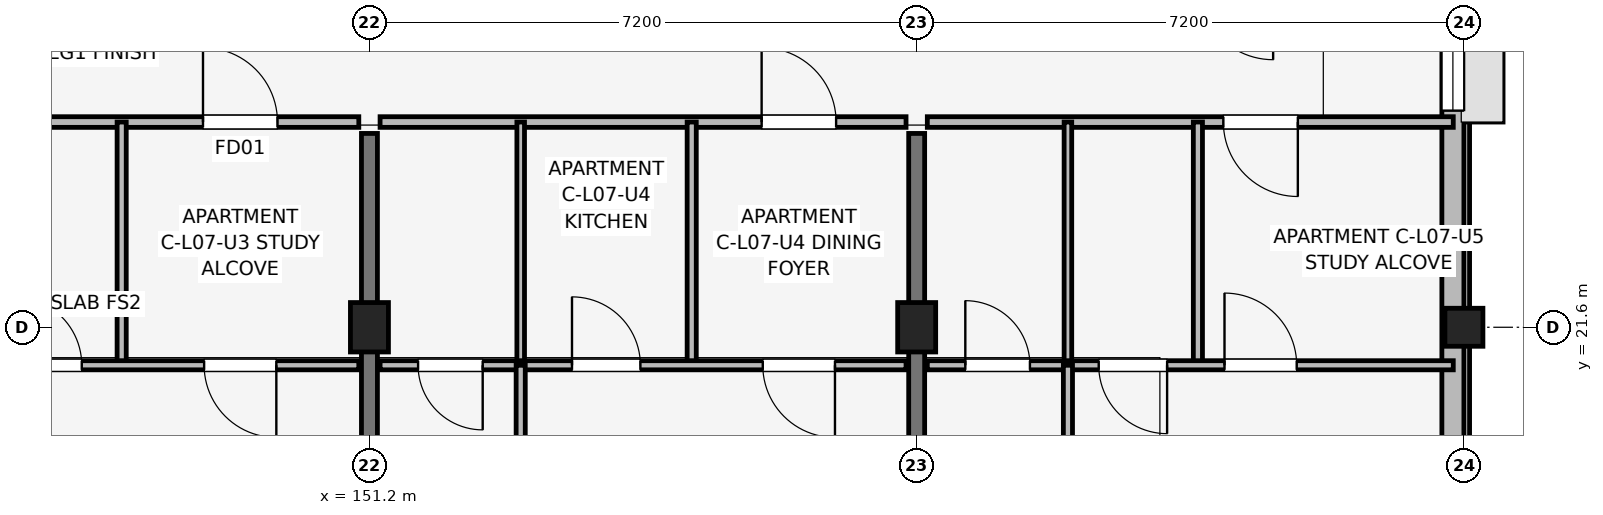
"""IFC4 building model, lengths in metres.
Left out: names, types, materials, properties, quantities, classifications, styles, units other than length and angle.
Written with IfcOpenShell. Run it as: python <this file> out.ifc"""

import sys

from ifc_helpers import new_model, si_unit, direction, frame, frame_2d, origin, origin_2d, place, context, subcontext, project, spatial, rectangle, extrude, element, fill, save


model = new_model("IFC4")
c1 = context("Model", 3, precision=1e-05, world=origin(), true_north=direction((0.0, 1.0)))
c2 = subcontext(c1, "Body", "Model", "MODEL_VIEW")
j1 = project(units=[si_unit("LENGTHUNIT", "METRE"), si_unit("PLANEANGLEUNIT", "RADIAN")], contexts=[c1])
p1 = place(None, origin())
s1 = spatial("IfcSite", under=j1, at=p1, CompositionType="ELEMENT")
p2 = place(p1, origin())
s2 = spatial("IfcBuilding", under=s1, at=p2, CompositionType="ELEMENT")
p3 = place(p2, frame((0.0, 0.0, 24.45)))
s3 = spatial("IfcBuildingStorey", under=s2, at=p3, CompositionType="ELEMENT", Elevation=24.45)
for number, where, z_axis, x_axis in (
    (1, (151.2, 21.6, 0.0), (0.0, 0.0, 1.0), (1.0, 0.0, 0.0)),
    (2, (158.4, 21.6, 0.0), (0.0, 0.0, 1.0), (1.0, 0.0, 0.0)),
):
    element("IfcColumn", number, at=place(p3, frame(where, z_axis=z_axis, x_axis=x_axis)), inside=s3, PredefinedType="COLUMN", context=c2, shape_type="SweptSolid", body=[
        extrude(rectangle(XDim=0.5, YDim=0.65, at=origin_2d()), origin(), (0.0, 0.0, 1.0), 3.15),
    ])
p4 = place(p3, frame((165.6, 21.6, 0.0), z_axis=(0.0, 0.0, 1.0), x_axis=(1.0, 0.0, 0.0)))
e3 = element("IfcColumn", 3, at=p4, inside=s3, PredefinedType="COLUMN", context=c2, shape_type="SweptSolid", body=[
    extrude(rectangle(XDim=0.5, YDim=0.5, at=origin_2d()), origin(), (0.0, 0.0, 1.0), 3.15),
])
for number, where, z_axis, x_axis in (
    (4, (151.2, 14.75, 0.0), (0.0, 0.0, 1.0), (0.0, 1.0, 0.0)),
    (5, (158.4, 14.75, 0.0), (0.0, 0.0, 1.0), (0.0, 1.0, 0.0)),
):
    element("IfcWall", number, at=place(p3, frame(where, z_axis=z_axis, x_axis=x_axis)), inside=s3, PredefinedType="SHEAR", context=c2, shape_type="SweptSolid", body=[
        extrude(rectangle(XDim=9.4, YDim=0.21, at=frame_2d((4.7, 0.0))), origin(), (0.0, 0.0, 1.0), 3.15),
    ])
p5 = place(p3, frame((165.455, 17.4, 0.0), z_axis=(0.0, 0.0, 1.0), x_axis=(0.0, 1.0, 0.0)))
e6 = element("IfcWall", 6, at=p5, inside=s3, PredefinedType="SOLIDWALL", context=c2, shape_type="SweptSolid", body=[
    extrude(rectangle(XDim=15.6, YDim=0.29, at=frame_2d((7.8, 0.0))), origin(), (0.0, 0.0, 1.0), 2.43),
])
p6 = place(p5, frame((7.05, 0.0, 1.05)))
e7 = element("IfcOpeningElement", 7, at=p6, cuts=e6, PredefinedType="OPENING", context=c2, shape_type="SweptSolid", body=[
    extrude(rectangle(XDim=1.5, YDim=1.15, at=frame_2d((0.75, 0.575))), frame((0.0, 0.155, 0.0), z_axis=(0.0, -1.0, 0.0), x_axis=(1.0, 0.0, 0.0)), (0.0, 0.0, 1.0), 0.31),
])
p7 = place(p5, frame((1.255, 0.0, 0.72)))
e8 = element("IfcOpeningElement", 8, at=p7, cuts=e6, PredefinedType="OPENING", context=c2, shape_type="SweptSolid", body=[
    extrude(rectangle(XDim=1.42, YDim=1.6, at=frame_2d((0.71, 0.8))), frame((0.0, 0.155, 0.0), z_axis=(0.0, -1.0, 0.0), x_axis=(1.0, 0.0, 0.0)), (0.0, 0.0, 1.0), 0.31),
])
p8 = place(p3, frame((144.14, 24.3, 0.0), z_axis=(0.0, 0.0, 1.0), x_axis=(1.0, 0.0, 0.0)))
e9 = element("IfcWall", 9, at=p8, inside=s3, PredefinedType="PARTITIONING", context=c2, shape_type="SweptSolid", body=[
    extrude(rectangle(XDim=6.92, YDim=0.14, at=frame_2d((3.46, 0.0))), origin(), (0.0, 0.0, 1.0), 2.38),
])
p9 = place(p8, frame((4.87, 0.0, 0.0)))
e10 = element("IfcOpeningElement", 10, at=p9, cuts=e9, PredefinedType="OPENING", context=c2, shape_type="SweptSolid", body=[
    extrude(rectangle(XDim=0.98, YDim=2.1, at=frame_2d((0.49, 1.05))), frame((0.0, 0.08, 0.0), z_axis=(0.0, -1.0, 0.0), x_axis=(1.0, 0.0, 0.0)), (0.0, 0.0, 1.0), 0.16),
])
p10 = place(p3, frame((147.94, 21.1, 0.0), z_axis=(0.0, 0.0, 1.0), x_axis=(0.0, 1.0, 0.0)))
e11 = element("IfcWall", 11, at=p10, inside=s3, PredefinedType="PARTITIONING", context=c2, shape_type="SweptSolid", body=[
    extrude(rectangle(XDim=3.2, YDim=0.12, at=frame_2d((1.6, 0.0))), origin(), (0.0, 0.0, 1.0), 2.38),
])
p11 = place(p3, frame((144.14, 21.1, 0.0), z_axis=(0.0, 0.0, 1.0), x_axis=(1.0, 0.0, 0.0)))
e12 = element("IfcWall", 12, at=p11, inside=s3, PredefinedType="PARTITIONING", context=c2, shape_type="SweptSolid", body=[
    extrude(rectangle(XDim=6.92, YDim=0.12, at=frame_2d((3.46, 0.0))), origin(), (0.0, 0.0, 1.0), 2.38),
])
p12 = place(p11, frame((1.35, 0.0, 0.0), z_axis=(0.0, 0.0, 1.0), x_axis=(-1.0, 0.0, 0.0)))
e13 = element("IfcOpeningElement", 13, at=p12, cuts=e12, PredefinedType="OPENING", context=c2, shape_type="SweptSolid", body=[
    extrude(rectangle(XDim=0.85, YDim=2.08, at=frame_2d((0.425, 1.04))), frame((0.0, 0.07, 0.0), z_axis=(0.0, -1.0, 0.0), x_axis=(1.0, 0.0, 0.0)), (0.0, 0.0, 1.0), 0.14),
])
p13 = place(p11, frame((2.375, 0.0, 0.0)))
e14 = element("IfcOpeningElement", 14, at=p13, cuts=e12, PredefinedType="OPENING", context=c2, shape_type="SweptSolid", body=[
    extrude(rectangle(XDim=0.9, YDim=2.08, at=frame_2d((0.45, 1.04))), frame((0.0, 0.07, 0.0), z_axis=(0.0, -1.0, 0.0), x_axis=(1.0, 0.0, 0.0)), (0.0, 0.0, 1.0), 0.14),
])
p14 = place(p11, frame((5.835, 0.0, 0.0), z_axis=(0.0, 0.0, 1.0), x_axis=(-1.0, 0.0, 0.0)))
e15 = element("IfcOpeningElement", 15, at=p14, cuts=e12, PredefinedType="OPENING", context=c2, shape_type="SweptSolid", body=[
    extrude(rectangle(XDim=0.95, YDim=2.08, at=frame_2d((0.475, 1.04))), frame((0.0, 0.07, 0.0), z_axis=(0.0, -1.0, 0.0), x_axis=(1.0, 0.0, 0.0)), (0.0, 0.0, 1.0), 0.14),
])
p15 = place(p3, frame((151.34, 24.3, 0.0), z_axis=(0.0, 0.0, 1.0), x_axis=(1.0, 0.0, 0.0)))
e16 = element("IfcWall", 16, at=p15, inside=s3, PredefinedType="PARTITIONING", context=c2, shape_type="SweptSolid", body=[
    extrude(rectangle(XDim=6.92, YDim=0.14, at=frame_2d((3.46, 0.0))), origin(), (0.0, 0.0, 1.0), 2.38),
])
p16 = place(p15, frame((5.02, 0.0, 0.0)))
e17 = element("IfcOpeningElement", 17, at=p16, cuts=e16, PredefinedType="OPENING", context=c2, shape_type="SweptSolid", body=[
    extrude(rectangle(XDim=0.98, YDim=2.1, at=frame_2d((0.49, 1.05))), frame((0.0, 0.08, 0.0), z_axis=(0.0, -1.0, 0.0), x_axis=(1.0, 0.0, 0.0)), (0.0, 0.0, 1.0), 0.16),
])
p17 = place(p3, frame((153.19, 21.1, 0.0), z_axis=(0.0, 0.0, 1.0), x_axis=(0.0, 1.0, 0.0)))
e18 = element("IfcWall", 18, at=p17, inside=s3, PredefinedType="PARTITIONING", context=c2, shape_type="SweptSolid", body=[
    extrude(rectangle(XDim=3.2, YDim=0.1, at=frame_2d((1.6, 0.0))), origin(), (0.0, 0.0, 1.0), 2.38),
])
p18 = place(p3, frame((155.44, 21.1, 0.0), z_axis=(0.0, 0.0, 1.0), x_axis=(0.0, 1.0, 0.0)))
e19 = element("IfcWall", 19, at=p18, inside=s3, PredefinedType="PARTITIONING", context=c2, shape_type="SweptSolid", body=[
    extrude(rectangle(XDim=3.2, YDim=0.12, at=frame_2d((1.6, 0.0))), origin(), (0.0, 0.0, 1.0), 2.38),
])
p19 = place(p3, frame((151.34, 21.1, 0.0), z_axis=(0.0, 0.0, 1.0), x_axis=(1.0, 0.0, 0.0)))
e20 = element("IfcWall", 20, at=p19, inside=s3, PredefinedType="PARTITIONING", context=c2, shape_type="SweptSolid", body=[
    extrude(rectangle(XDim=6.92, YDim=0.12, at=frame_2d((3.46, 0.0))), origin(), (0.0, 0.0, 1.0), 2.38),
])
p20 = place(p19, frame((1.35, 0.0, 0.0), z_axis=(0.0, 0.0, 1.0), x_axis=(-1.0, 0.0, 0.0)))
e21 = element("IfcOpeningElement", 21, at=p20, cuts=e20, PredefinedType="OPENING", context=c2, shape_type="SweptSolid", body=[
    extrude(rectangle(XDim=0.85, YDim=2.08, at=frame_2d((0.425, 1.04))), frame((0.0, 0.07, 0.0), z_axis=(0.0, -1.0, 0.0), x_axis=(1.0, 0.0, 0.0)), (0.0, 0.0, 1.0), 0.14),
])
p21 = place(p19, frame((2.525, 0.0, 0.0)))
e22 = element("IfcOpeningElement", 22, at=p21, cuts=e20, PredefinedType="OPENING", context=c2, shape_type="SweptSolid", body=[
    extrude(rectangle(XDim=0.9, YDim=2.08, at=frame_2d((0.45, 1.04))), frame((0.0, 0.07, 0.0), z_axis=(0.0, -1.0, 0.0), x_axis=(1.0, 0.0, 0.0)), (0.0, 0.0, 1.0), 0.14),
])
p22 = place(p19, frame((5.985, 0.0, 0.0), z_axis=(0.0, 0.0, 1.0), x_axis=(-1.0, 0.0, 0.0)))
e23 = element("IfcOpeningElement", 23, at=p22, cuts=e20, PredefinedType="OPENING", context=c2, shape_type="SweptSolid", body=[
    extrude(rectangle(XDim=0.95, YDim=2.08, at=frame_2d((0.475, 1.04))), frame((0.0, 0.07, 0.0), z_axis=(0.0, -1.0, 0.0), x_axis=(1.0, 0.0, 0.0)), (0.0, 0.0, 1.0), 0.14),
])
p23 = place(p3, frame((153.19, 14.7, 0.0), z_axis=(0.0, 0.0, 1.0), x_axis=(0.0, 1.0, 0.0)))
e24 = element("IfcWall", 24, at=p23, inside=s3, PredefinedType="PARTITIONING", context=c2, shape_type="SweptSolid", body=[
    extrude(rectangle(XDim=6.4, YDim=0.12, at=frame_2d((3.2, 0.0))), origin(), (0.0, 0.0, 1.0), 2.38),
])
p24 = place(p23, frame((2.75, 0.0, 0.0)))
e25 = element("IfcOpeningElement", 25, at=p24, cuts=e24, PredefinedType="OPENING", context=c2, shape_type="SweptSolid", body=[
    extrude(rectangle(XDim=0.9, YDim=2.08, at=frame_2d((0.45, 1.04))), frame((0.0, 0.07, 0.0), z_axis=(0.0, -1.0, 0.0), x_axis=(1.0, 0.0, 0.0)), (0.0, 0.0, 1.0), 0.14),
])
p25 = place(p3, frame((158.54, 24.3, 0.0), z_axis=(0.0, 0.0, 1.0), x_axis=(1.0, 0.0, 0.0)))
e26 = element("IfcWall", 26, at=p25, inside=s3, PredefinedType="PARTITIONING", context=c2, shape_type="SweptSolid", body=[
    extrude(rectangle(XDim=6.92, YDim=0.14, at=frame_2d((3.46, 0.0))), origin(), (0.0, 0.0, 1.0), 2.38),
])
p26 = place(p25, frame((4.875, 0.0, 0.0), z_axis=(0.0, 0.0, 1.0), x_axis=(-1.0, 0.0, 0.0)))
e27 = element("IfcOpeningElement", 27, at=p26, cuts=e26, PredefinedType="OPENING", context=c2, shape_type="SweptSolid", body=[
    extrude(rectangle(XDim=0.98, YDim=2.1, at=frame_2d((0.49, 1.05))), frame((0.0, 0.08, 0.0), z_axis=(0.0, -1.0, 0.0), x_axis=(1.0, 0.0, 0.0)), (0.0, 0.0, 1.0), 0.16),
])
p27 = place(p3, frame((160.39, 21.1, 0.0), z_axis=(0.0, 0.0, 1.0), x_axis=(0.0, 1.0, 0.0)))
e28 = element("IfcWall", 28, at=p27, inside=s3, PredefinedType="PARTITIONING", context=c2, shape_type="SweptSolid", body=[
    extrude(rectangle(XDim=3.2, YDim=0.1, at=frame_2d((1.6, 0.0))), origin(), (0.0, 0.0, 1.0), 2.38),
])
p28 = place(p3, frame((162.1, 21.1, 0.0), z_axis=(0.0, 0.0, 1.0), x_axis=(0.0, 1.0, 0.0)))
e29 = element("IfcWall", 29, at=p28, inside=s3, PredefinedType="PARTITIONING", context=c2, shape_type="SweptSolid", body=[
    extrude(rectangle(XDim=3.2, YDim=0.12, at=frame_2d((1.6, 0.0))), origin(), (0.0, 0.0, 1.0), 2.38),
])
p29 = place(p3, frame((158.54, 21.1, 0.0), z_axis=(0.0, 0.0, 1.0), x_axis=(1.0, 0.0, 0.0)))
e30 = element("IfcWall", 30, at=p29, inside=s3, PredefinedType="PARTITIONING", context=c2, shape_type="SweptSolid", body=[
    extrude(rectangle(XDim=6.92, YDim=0.12, at=frame_2d((3.46, 0.0))), origin(), (0.0, 0.0, 1.0), 2.38),
])
p30 = place(p29, frame((0.5, 0.0, 0.0)))
e31 = element("IfcOpeningElement", 31, at=p30, cuts=e30, PredefinedType="OPENING", context=c2, shape_type="SweptSolid", body=[
    extrude(rectangle(XDim=0.85, YDim=2.08, at=frame_2d((0.425, 1.04))), frame((0.0, 0.07, 0.0), z_axis=(0.0, -1.0, 0.0), x_axis=(1.0, 0.0, 0.0)), (0.0, 0.0, 1.0), 0.14),
])
p31 = place(p29, frame((3.155, 0.0, 0.0), z_axis=(0.0, 0.0, 1.0), x_axis=(-1.0, 0.0, 0.0)))
e32 = element("IfcOpeningElement", 32, at=p31, cuts=e30, PredefinedType="OPENING", context=c2, shape_type="SweptSolid", body=[
    extrude(rectangle(XDim=0.9, YDim=2.08, at=frame_2d((0.45, 1.04))), frame((0.0, 0.07, 0.0), z_axis=(0.0, -1.0, 0.0), x_axis=(1.0, 0.0, 0.0)), (0.0, 0.0, 1.0), 0.14),
])
p32 = place(p29, frame((3.91, 0.0, 0.0)))
e33 = element("IfcOpeningElement", 33, at=p32, cuts=e30, PredefinedType="OPENING", context=c2, shape_type="SweptSolid", body=[
    extrude(rectangle(XDim=0.95, YDim=2.08, at=frame_2d((0.475, 1.04))), frame((0.0, 0.07, 0.0), z_axis=(0.0, -1.0, 0.0), x_axis=(1.0, 0.0, 0.0)), (0.0, 0.0, 1.0), 0.14),
])
p33 = place(p3, frame((160.39, 14.7, 0.0), z_axis=(0.0, 0.0, 1.0), x_axis=(0.0, 1.0, 0.0)))
e34 = element("IfcWall", 34, at=p33, inside=s3, PredefinedType="PARTITIONING", context=c2, shape_type="SweptSolid", body=[
    extrude(rectangle(XDim=6.4, YDim=0.12, at=frame_2d((3.2, 0.0))), origin(), (0.0, 0.0, 1.0), 2.38),
])
p34 = place(p33, frame((2.75, 0.0, 0.0)))
e35 = element("IfcOpeningElement", 35, at=p34, cuts=e34, PredefinedType="OPENING", context=c2, shape_type="SweptSolid", body=[
    extrude(rectangle(XDim=0.9, YDim=2.08, at=frame_2d((0.45, 1.04))), frame((0.0, 0.07, 0.0), z_axis=(0.0, -1.0, 0.0), x_axis=(1.0, 0.0, 0.0)), (0.0, 0.0, 1.0), 0.14),
])
p35 = place(p6, origin())
e36 = element("IfcWindow", 36, at=p35, inside=s3, PartitioningType="SINGLE_PANEL", PredefinedType="WINDOW", context=c2, shape_type="SweptSolid", body=[
    extrude(rectangle(XDim=1.5, YDim=1.15, at=frame_2d((0.75, 0.575))), frame((0.0, 0.03, 0.0), z_axis=(0.0, -1.0, 0.0), x_axis=(1.0, 0.0, 0.0)), (0.0, 0.0, 1.0), 0.06),
])
fill(e7, e36)
p36 = place(p9, origin())
e37 = element("IfcDoor", 37, at=p36, inside=s3, OperationType="SINGLE_SWING_LEFT", PredefinedType="DOOR", context=c2, shape_type="SweptSolid", body=[
    extrude(rectangle(XDim=0.98, YDim=2.1, at=frame_2d((0.49, 1.05))), frame((0.0, 0.025, 0.0), z_axis=(0.0, -1.0, 0.0), x_axis=(1.0, 0.0, 0.0)), (0.0, 0.0, 1.0), 0.05),
])
fill(e10, e37)
p37 = place(p13, origin())
e38 = element("IfcDoor", 38, at=p37, inside=s3, OperationType="SINGLE_SWING_LEFT", PredefinedType="DOOR", context=c2, shape_type="SweptSolid", body=[
    extrude(rectangle(XDim=0.9, YDim=2.08, at=frame_2d((0.45, 1.04))), frame((0.0, 0.025, 0.0), z_axis=(0.0, -1.0, 0.0), x_axis=(1.0, 0.0, 0.0)), (0.0, 0.0, 1.0), 0.05),
])
fill(e14, e38)
p38 = place(p14, origin())
e39 = element("IfcDoor", 39, at=p38, inside=s3, OperationType="SINGLE_SWING_RIGHT", PredefinedType="DOOR", context=c2, shape_type="SweptSolid", body=[
    extrude(rectangle(XDim=0.95, YDim=2.08, at=frame_2d((0.475, 1.04))), frame((0.0, 0.025, 0.0), z_axis=(0.0, -1.0, 0.0), x_axis=(1.0, 0.0, 0.0)), (0.0, 0.0, 1.0), 0.05),
])
fill(e15, e39)
p39 = place(p16, origin())
e40 = element("IfcDoor", 40, at=p39, inside=s3, OperationType="SINGLE_SWING_LEFT", PredefinedType="DOOR", context=c2, shape_type="SweptSolid", body=[
    extrude(rectangle(XDim=0.98, YDim=2.1, at=frame_2d((0.49, 1.05))), frame((0.0, 0.025, 0.0), z_axis=(0.0, -1.0, 0.0), x_axis=(1.0, 0.0, 0.0)), (0.0, 0.0, 1.0), 0.05),
])
fill(e17, e40)
p40 = place(p20, origin())
e41 = element("IfcDoor", 41, at=p40, inside=s3, OperationType="SINGLE_SWING_RIGHT", PredefinedType="DOOR", context=c2, shape_type="SweptSolid", body=[
    extrude(rectangle(XDim=0.85, YDim=2.08, at=frame_2d((0.425, 1.04))), frame((0.0, 0.025, 0.0), z_axis=(0.0, -1.0, 0.0), x_axis=(1.0, 0.0, 0.0)), (0.0, 0.0, 1.0), 0.05),
])
fill(e21, e41)
p41 = place(p21, origin())
e42 = element("IfcDoor", 42, at=p41, inside=s3, OperationType="SINGLE_SWING_LEFT", PredefinedType="DOOR", context=c2, shape_type="SweptSolid", body=[
    extrude(rectangle(XDim=0.9, YDim=2.08, at=frame_2d((0.45, 1.04))), frame((0.0, 0.025, 0.0), z_axis=(0.0, -1.0, 0.0), x_axis=(1.0, 0.0, 0.0)), (0.0, 0.0, 1.0), 0.05),
])
fill(e22, e42)
p42 = place(p22, origin())
e43 = element("IfcDoor", 43, at=p42, inside=s3, OperationType="SINGLE_SWING_RIGHT", PredefinedType="DOOR", context=c2, shape_type="SweptSolid", body=[
    extrude(rectangle(XDim=0.95, YDim=2.08, at=frame_2d((0.475, 1.04))), frame((0.0, 0.025, 0.0), z_axis=(0.0, -1.0, 0.0), x_axis=(1.0, 0.0, 0.0)), (0.0, 0.0, 1.0), 0.05),
])
fill(e23, e43)
p43 = place(p26, origin())
e44 = element("IfcDoor", 44, at=p43, inside=s3, OperationType="SINGLE_SWING_RIGHT", PredefinedType="DOOR", context=c2, shape_type="SweptSolid", body=[
    extrude(rectangle(XDim=0.98, YDim=2.1, at=frame_2d((0.49, 1.05))), frame((0.0, 0.025, 0.0), z_axis=(0.0, -1.0, 0.0), x_axis=(1.0, 0.0, 0.0)), (0.0, 0.0, 1.0), 0.05),
])
fill(e27, e44)
p44 = place(p30, origin())
e45 = element("IfcDoor", 45, at=p44, inside=s3, OperationType="SINGLE_SWING_LEFT", PredefinedType="DOOR", context=c2, shape_type="SweptSolid", body=[
    extrude(rectangle(XDim=0.85, YDim=2.08, at=frame_2d((0.425, 1.04))), frame((0.0, 0.025, 0.0), z_axis=(0.0, -1.0, 0.0), x_axis=(1.0, 0.0, 0.0)), (0.0, 0.0, 1.0), 0.05),
])
fill(e31, e45)
p45 = place(p31, origin())
e46 = element("IfcDoor", 46, at=p45, inside=s3, OperationType="SINGLE_SWING_RIGHT", PredefinedType="DOOR", context=c2, shape_type="SweptSolid", body=[
    extrude(rectangle(XDim=0.9, YDim=2.08, at=frame_2d((0.45, 1.04))), frame((0.0, 0.025, 0.0), z_axis=(0.0, -1.0, 0.0), x_axis=(1.0, 0.0, 0.0)), (0.0, 0.0, 1.0), 0.05),
])
fill(e32, e46)
p46 = place(p32, origin())
e47 = element("IfcDoor", 47, at=p46, inside=s3, OperationType="SINGLE_SWING_LEFT", PredefinedType="DOOR", context=c2, shape_type="SweptSolid", body=[
    extrude(rectangle(XDim=0.95, YDim=2.08, at=frame_2d((0.475, 1.04))), frame((0.0, 0.025, 0.0), z_axis=(0.0, -1.0, 0.0), x_axis=(1.0, 0.0, 0.0)), (0.0, 0.0, 1.0), 0.05),
])
fill(e33, e47)
save(model, sys.argv[1])
